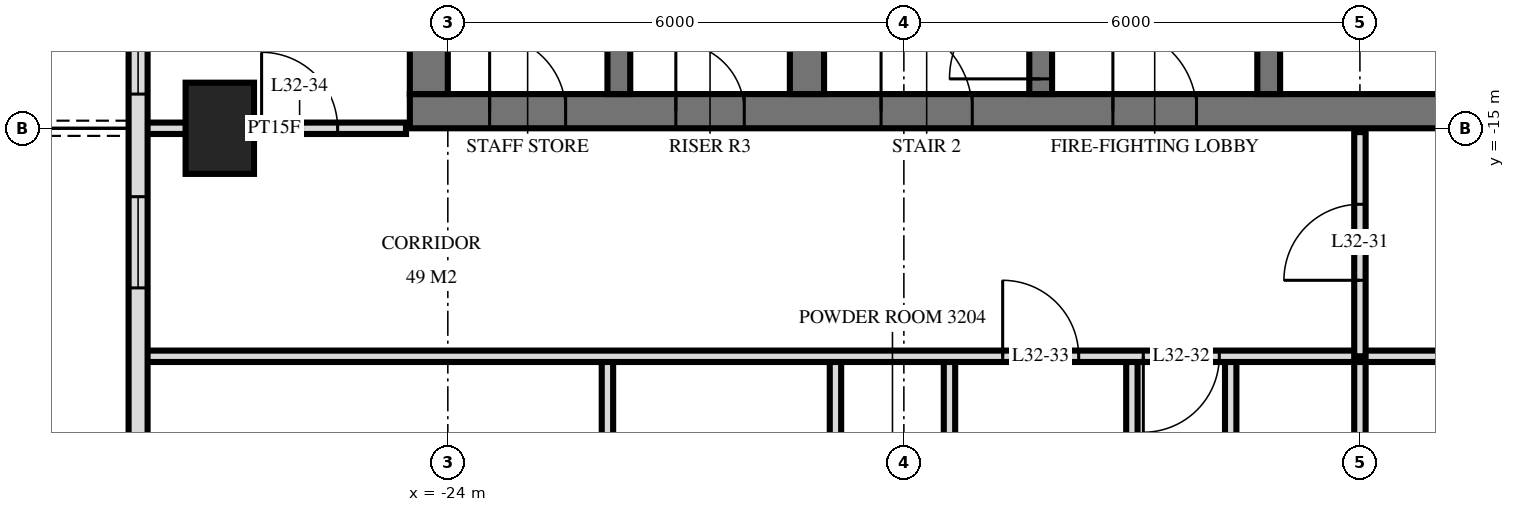
"""IFC4 building model, lengths in metres.
Left out: names, types, materials, properties, quantities, classifications, styles, units other than length and angle.
Written with IfcOpenShell. Run it as: python <this file> out.ifc"""

import sys

from ifc_helpers import new_model, si_unit, direction, frame, frame_2d, origin, origin_2d, place, context, subcontext, project, spatial, rectangle, extrude, element, fill, save


model = new_model("IFC4")
c1 = context("Model", 3, precision=1e-05, world=origin(), true_north=direction((0.0, 1.0)))
c2 = subcontext(c1, "Body", "Model", "MODEL_VIEW")
j1 = project(units=[si_unit("LENGTHUNIT", "METRE"), si_unit("PLANEANGLEUNIT", "RADIAN")], contexts=[c1])
p1 = place(None, origin())
s1 = spatial("IfcSite", under=j1, at=p1, CompositionType="ELEMENT")
p2 = place(p1, origin())
s2 = spatial("IfcBuilding", under=s1, at=p2, CompositionType="ELEMENT")
p3 = place(p2, frame((0.0, 0.0, 127.2)))
s3 = spatial("IfcBuildingStorey", under=s2, at=p3, CompositionType="ELEMENT", Elevation=127.2)
p4 = place(p3, frame((-27.0, -15.0, 0.0), z_axis=(0.0, 0.0, 1.0), x_axis=(0.0, 1.0, 0.0)))
e1 = element("IfcColumn", 1, at=p4, inside=s3, PredefinedType="COLUMN", context=c2, shape_type="SweptSolid", body=[
    extrude(rectangle(XDim=1.2, YDim=0.9, at=origin_2d()), origin(), (0.0, 0.0, 1.0), 3.6),
])
p5 = place(p3, frame((-24.5, -14.775, 0.0), z_axis=(0.0, 0.0, 1.0), x_axis=(1.0, 0.0, 0.0)))
e2 = element("IfcWall", 2, at=p5, inside=s3, PredefinedType="SHEAR", context=c2, shape_type="SweptSolid", body=[
    extrude(rectangle(XDim=14.5, YDim=0.45, at=frame_2d((7.25, 0.0))), origin(), (0.0, 0.0, 1.0), 3.6),
])
p6 = place(p5, frame((6.2, 0.0, 0.0)))
e3 = element("IfcOpeningElement", 3, at=p6, cuts=e2, PredefinedType="OPENING", context=c2, shape_type="SweptSolid", body=[
    extrude(rectangle(XDim=1.2, YDim=2.1, at=frame_2d((0.6, 1.05))), frame((0.0, 0.235, 0.0), z_axis=(0.0, -1.0, 0.0), x_axis=(1.0, 0.0, 0.0)), (0.0, 0.0, 1.0), 0.47),
])
p7 = place(p5, frame((9.25, 0.0, 0.0)))
e4 = element("IfcOpeningElement", 4, at=p7, cuts=e2, PredefinedType="OPENING", context=c2, shape_type="SweptSolid", body=[
    extrude(rectangle(XDim=1.1, YDim=2.1, at=frame_2d((0.55, 1.05))), frame((0.0, 0.235, 0.0), z_axis=(0.0, -1.0, 0.0), x_axis=(1.0, 0.0, 0.0)), (0.0, 0.0, 1.0), 0.47),
])
p8 = place(p5, frame((3.5, 0.0, 0.0)))
e5 = element("IfcOpeningElement", 5, at=p8, cuts=e2, PredefinedType="OPENING", context=c2, shape_type="SweptSolid", body=[
    extrude(rectangle(XDim=0.9, YDim=2.1, at=frame_2d((0.45, 1.05))), frame((0.0, 0.235, 0.0), z_axis=(0.0, -1.0, 0.0), x_axis=(1.0, 0.0, 0.0)), (0.0, 0.0, 1.0), 0.47),
])
p9 = place(p5, frame((1.05, 0.0, 0.0)))
e6 = element("IfcOpeningElement", 6, at=p9, cuts=e2, PredefinedType="OPENING", context=c2, shape_type="SweptSolid", body=[
    extrude(rectangle(XDim=1.0, YDim=2.1, at=frame_2d((0.5, 1.05))), frame((0.0, 0.235, 0.0), z_axis=(0.0, -1.0, 0.0), x_axis=(1.0, 0.0, 0.0)), (0.0, 0.0, 1.0), 0.47),
])
p10 = place(p3, frame((-24.25, -14.55, 0.0), z_axis=(0.0, 0.0, 1.0), x_axis=(0.0, 1.0, 0.0)))
e7 = element("IfcWall", 7, at=p10, inside=s3, PredefinedType="SHEAR", context=c2, shape_type="SweptSolid", body=[
    extrude(rectangle(XDim=14.1, YDim=0.5, at=frame_2d((7.05, 0.0))), origin(), (0.0, 0.0, 1.0), 3.6),
])
p11 = place(p3, frame((-13.2, -14.55, 0.0), z_axis=(0.0, 0.0, 1.0), x_axis=(0.0, 1.0, 0.0)))
e8 = element("IfcWall", 8, at=p11, inside=s3, PredefinedType="SHEAR", context=c2, shape_type="SweptSolid", body=[
    extrude(rectangle(XDim=5.4, YDim=0.3, at=frame_2d((2.7, 0.0))), origin(), (0.0, 0.0, 1.0), 3.6),
])
p12 = place(p11, frame((4.0, 0.0, 0.0)))
e9 = element("IfcOpeningElement", 9, at=p12, cuts=e8, PredefinedType="OPENING", context=c2, shape_type="SweptSolid", body=[
    extrude(rectangle(XDim=1.2, YDim=2.1, at=frame_2d((0.6, 1.05))), frame((0.0, 0.16, 0.0), z_axis=(0.0, -1.0, 0.0), x_axis=(1.0, 0.0, 0.0)), (0.0, 0.0, 1.0), 0.32),
])
p13 = place(p3, frame((-16.2, -14.55, 0.0), z_axis=(0.0, 0.0, 1.0), x_axis=(0.0, 1.0, 0.0)))
e10 = element("IfcWall", 10, at=p13, inside=s3, PredefinedType="SHEAR", context=c2, shape_type="SweptSolid", body=[
    extrude(rectangle(XDim=5.4, YDim=0.3, at=frame_2d((2.7, 0.0))), origin(), (0.0, 0.0, 1.0), 3.6),
])
p14 = place(p13, frame((0.2, 0.0, 0.0)))
e11 = element("IfcOpeningElement", 11, at=p14, cuts=e10, PredefinedType="OPENING", context=c2, shape_type="SweptSolid", body=[
    extrude(rectangle(XDim=1.2, YDim=2.1, at=frame_2d((0.6, 1.05))), frame((0.0, 0.16, 0.0), z_axis=(0.0, -1.0, 0.0), x_axis=(1.0, 0.0, 0.0)), (0.0, 0.0, 1.0), 0.32),
])
p15 = place(p3, frame((-19.275, -14.55, 0.0), z_axis=(0.0, 0.0, 1.0), x_axis=(0.0, 1.0, 0.0)))
e12 = element("IfcWall", 12, at=p15, inside=s3, PredefinedType="SHEAR", context=c2, shape_type="SweptSolid", body=[
    extrude(rectangle(XDim=5.4, YDim=0.45, at=frame_2d((2.7, 0.0))), origin(), (0.0, 0.0, 1.0), 3.6),
])
p16 = place(p3, frame((-21.75, -14.55, 0.0), z_axis=(0.0, 0.0, 1.0), x_axis=(0.0, 1.0, 0.0)))
e13 = element("IfcWall", 13, at=p16, inside=s3, PredefinedType="SHEAR", context=c2, shape_type="SweptSolid", body=[
    extrude(rectangle(XDim=5.4, YDim=0.3, at=frame_2d((2.7, 0.0))), origin(), (0.0, 0.0, 1.0), 3.6),
])
p17 = place(p3, frame((-28.075, -3.325, 0.0), z_axis=(0.0, 0.0, 1.0), x_axis=(0.0, -1.0, 0.0)))
e14 = element("IfcWall", 14, at=p17, inside=s3, PredefinedType="SOLIDWALL", context=c2, shape_type="SweptSolid", body=[
    extrude(rectangle(XDim=25.951, YDim=0.25, at=frame_2d((12.975, 0.0))), origin(), (0.0, 0.0, 1.0), 3.32),
])
p18 = place(p17, frame((6.575, 0.0, 0.0)))
e15 = element("IfcOpeningElement", 15, at=p18, cuts=e14, PredefinedType="OPENING", context=c2, shape_type="SweptSolid", body=[
    extrude(rectangle(XDim=1.8, YDim=2.4, at=frame_2d((0.9, 1.2))), frame((0.0, 0.135, 0.0), z_axis=(0.0, -1.0, 0.0), x_axis=(1.0, 0.0, 0.0)), (0.0, 0.0, 1.0), 0.27),
])
p19 = place(p17, frame((9.425, 0.0, 0.3)))
e16 = element("IfcOpeningElement", 16, at=p19, cuts=e14, PredefinedType="OPENING", context=c2, shape_type="SweptSolid", body=[
    extrude(rectangle(XDim=1.8, YDim=2.1, at=frame_2d((0.9, 1.05))), frame((0.0, 0.135, 0.0), z_axis=(0.0, -1.0, 0.0), x_axis=(1.0, 0.0, 0.0)), (0.0, 0.0, 1.0), 0.27),
])
p20 = place(p17, frame((12.575, 0.0, 0.3)))
e17 = element("IfcOpeningElement", 17, at=p20, cuts=e14, PredefinedType="OPENING", context=c2, shape_type="SweptSolid", body=[
    extrude(rectangle(XDim=1.2, YDim=2.1, at=frame_2d((0.6, 1.05))), frame((0.0, 0.135, 0.0), z_axis=(0.0, -1.0, 0.0), x_axis=(1.0, 0.0, 0.0)), (0.0, 0.0, 1.0), 0.27),
])
p21 = place(p17, frame((15.875, 0.0, 0.0)))
e18 = element("IfcOpeningElement", 18, at=p21, cuts=e14, PredefinedType="OPENING", context=c2, shape_type="SweptSolid", body=[
    extrude(rectangle(XDim=1.8, YDim=2.4, at=frame_2d((0.9, 1.2))), frame((0.0, 0.135, 0.0), z_axis=(0.0, -1.0, 0.0), x_axis=(1.0, 0.0, 0.0)), (0.0, 0.0, 1.0), 0.27),
])
p22 = place(p17, frame((21.075, 0.0, 0.0)))
e19 = element("IfcOpeningElement", 19, at=p22, cuts=e14, PredefinedType="OPENING", context=c2, shape_type="SweptSolid", body=[
    extrude(rectangle(XDim=1.8, YDim=2.4, at=frame_2d((0.9, 1.2))), frame((0.0, 0.135, 0.0), z_axis=(0.0, -1.0, 0.0), x_axis=(1.0, 0.0, 0.0)), (0.0, 0.0, 1.0), 0.27),
])
p23 = place(p17, frame((23.825, 0.0, 0.3)))
e20 = element("IfcOpeningElement", 20, at=p23, cuts=e14, PredefinedType="OPENING", context=c2, shape_type="SweptSolid", body=[
    extrude(rectangle(XDim=1.8, YDim=2.1, at=frame_2d((0.9, 1.05))), frame((0.0, 0.135, 0.0), z_axis=(0.0, -1.0, 0.0), x_axis=(1.0, 0.0, 0.0)), (0.0, 0.0, 1.0), 0.27),
])
p24 = place(p3, frame((-12.0, -18.0, 0.0), z_axis=(0.0, 0.0, 1.0), x_axis=(0.0, 1.0, 0.0)))
e21 = element("IfcWall", 21, at=p24, inside=s3, PredefinedType="PARTITIONING", context=c2, shape_type="SweptSolid", body=[
    extrude(rectangle(XDim=2.95, YDim=0.15, at=frame_2d((1.475, 0.0))), origin(), (0.0, 0.0, 1.0), 3.32),
])
p25 = place(p24, frame((1.0, 0.0, 0.0)))
e22 = element("IfcOpeningElement", 22, at=p25, cuts=e21, PredefinedType="OPENING", context=c2, shape_type="SweptSolid", body=[
    extrude(rectangle(XDim=1.0, YDim=2.1, at=frame_2d((0.5, 1.05))), frame((0.0, 0.085, 0.0), z_axis=(0.0, -1.0, 0.0), x_axis=(1.0, 0.0, 0.0)), (0.0, 0.0, 1.0), 0.17),
])
p26 = place(p3, frame((-12.0, -33.62, 0.0), z_axis=(0.0, 0.0, 1.0), x_axis=(0.0, 1.0, 0.0)))
e23 = element("IfcWall", 23, at=p26, inside=s3, PredefinedType="PARTITIONING", context=c2, shape_type="SweptSolid", body=[
    extrude(rectangle(XDim=15.62, YDim=0.15, at=frame_2d((7.81, 0.0))), origin(), (0.0, 0.0, 1.0), 3.32),
])
p27 = place(p3, frame((-13.7, -23.0, 0.0), z_axis=(0.0, 0.0, 1.0), x_axis=(0.0, 1.0, 0.0)))
e24 = element("IfcWall", 24, at=p27, inside=s3, PredefinedType="PARTITIONING", context=c2, shape_type="SweptSolid", body=[
    extrude(rectangle(XDim=5.0, YDim=0.15, at=frame_2d((2.5, 0.0))), origin(), (0.0, 0.0, 1.0), 3.32),
])
p28 = place(p27, frame((2.12, 0.0, 0.0)))
e25 = element("IfcOpeningElement", 25, at=p28, cuts=e24, PredefinedType="OPENING", context=c2, shape_type="SweptSolid", body=[
    extrude(rectangle(XDim=0.8, YDim=2.1, at=frame_2d((0.4, 1.05))), frame((0.0, 0.085, 0.0), z_axis=(0.0, -1.0, 0.0), x_axis=(1.0, 0.0, 0.0)), (0.0, 0.0, 1.0), 0.17),
])
p29 = place(p3, frame((-15.0, -22.2, 0.0), z_axis=(0.0, 0.0, 1.0), x_axis=(0.0, 1.0, 0.0)))
e26 = element("IfcWall", 26, at=p29, inside=s3, PredefinedType="PARTITIONING", context=c2, shape_type="SweptSolid", body=[
    extrude(rectangle(XDim=4.2, YDim=0.15, at=frame_2d((2.1, 0.0))), origin(), (0.0, 0.0, 1.0), 3.32),
])
p30 = place(p3, frame((-17.4, -22.2, 0.0), z_axis=(0.0, 0.0, 1.0), x_axis=(0.0, 1.0, 0.0)))
e27 = element("IfcWall", 27, at=p30, inside=s3, PredefinedType="PARTITIONING", context=c2, shape_type="SweptSolid", body=[
    extrude(rectangle(XDim=4.2, YDim=0.15, at=frame_2d((2.1, 0.0))), origin(), (0.0, 0.0, 1.0), 3.32),
])
p31 = place(p30, frame((1.58, 0.0, 0.0)))
e28 = element("IfcOpeningElement", 28, at=p31, cuts=e27, PredefinedType="OPENING", context=c2, shape_type="SweptSolid", body=[
    extrude(rectangle(XDim=1.0, YDim=2.1, at=frame_2d((0.5, 1.05))), frame((0.0, 0.085, 0.0), z_axis=(0.0, -1.0, 0.0), x_axis=(1.0, 0.0, 0.0)), (0.0, 0.0, 1.0), 0.17),
])
p32 = place(p3, frame((-18.9, -22.2, 0.0), z_axis=(0.0, 0.0, 1.0), x_axis=(0.0, 1.0, 0.0)))
e29 = element("IfcWall", 29, at=p32, inside=s3, PredefinedType="PLUMBINGWALL", context=c2, shape_type="SweptSolid", body=[
    extrude(rectangle(XDim=4.2, YDim=0.15, at=frame_2d((2.1, 0.0))), origin(), (0.0, 0.0, 1.0), 3.32),
])
p33 = place(p3, frame((-21.9, -22.2, 0.0), z_axis=(0.0, 0.0, 1.0), x_axis=(0.0, 1.0, 0.0)))
e30 = element("IfcWall", 30, at=p33, inside=s3, PredefinedType="PARTITIONING", context=c2, shape_type="SweptSolid", body=[
    extrude(rectangle(XDim=4.2, YDim=0.15, at=frame_2d((2.1, 0.0))), origin(), (0.0, 0.0, 1.0), 3.32),
])
p34 = place(p3, frame((-28.02, -18.0, 0.0), z_axis=(0.0, 0.0, 1.0), x_axis=(1.0, 0.0, 0.0)))
e31 = element("IfcWall", 31, at=p34, inside=s3, PredefinedType="PARTITIONING", context=c2, shape_type="SweptSolid", body=[
    extrude(rectangle(XDim=56.04, YDim=0.15, at=frame_2d((28.02, 0.0))), origin(), (0.0, 0.0, 1.0), 3.32),
])
p35 = place(p34, frame((13.17, 0.0, 0.0)))
e32 = element("IfcOpeningElement", 32, at=p35, cuts=e31, PredefinedType="OPENING", context=c2, shape_type="SweptSolid", body=[
    extrude(rectangle(XDim=1.0, YDim=2.1, at=frame_2d((0.5, 1.05))), frame((0.0, 0.085, 0.0), z_axis=(0.0, -1.0, 0.0), x_axis=(1.0, 0.0, 0.0)), (0.0, 0.0, 1.0), 0.17),
])
p36 = place(p34, frame((11.32, 0.0, 0.0)))
e33 = element("IfcOpeningElement", 33, at=p36, cuts=e31, PredefinedType="OPENING", context=c2, shape_type="SweptSolid", body=[
    extrude(rectangle(XDim=1.0, YDim=2.1, at=frame_2d((0.5, 1.05))), frame((0.0, 0.085, 0.0), z_axis=(0.0, -1.0, 0.0), x_axis=(1.0, 0.0, 0.0)), (0.0, 0.0, 1.0), 0.17),
])
p37 = place(p34, frame((41.87, 0.0, 0.0)))
e34 = element("IfcOpeningElement", 34, at=p37, cuts=e31, PredefinedType="OPENING", context=c2, shape_type="SweptSolid", body=[
    extrude(rectangle(XDim=1.0, YDim=2.1, at=frame_2d((0.5, 1.05))), frame((0.0, 0.085, 0.0), z_axis=(0.0, -1.0, 0.0), x_axis=(1.0, 0.0, 0.0)), (0.0, 0.0, 1.0), 0.17),
])
p38 = place(p34, frame((43.17, 0.0, 0.0)))
e35 = element("IfcOpeningElement", 35, at=p38, cuts=e31, PredefinedType="OPENING", context=c2, shape_type="SweptSolid", body=[
    extrude(rectangle(XDim=1.0, YDim=2.1, at=frame_2d((0.5, 1.05))), frame((0.0, 0.085, 0.0), z_axis=(0.0, -1.0, 0.0), x_axis=(1.0, 0.0, 0.0)), (0.0, 0.0, 1.0), 0.17),
])
p39 = place(p34, frame((46.72, 0.0, 0.0)))
e36 = element("IfcOpeningElement", 36, at=p39, cuts=e31, PredefinedType="OPENING", context=c2, shape_type="SweptSolid", body=[
    extrude(rectangle(XDim=1.0, YDim=2.1, at=frame_2d((0.5, 1.05))), frame((0.0, 0.085, 0.0), z_axis=(0.0, -1.0, 0.0), x_axis=(1.0, 0.0, 0.0)), (0.0, 0.0, 1.0), 0.17),
])
p40 = place(p34, frame((21.52, 0.0, 0.0)))
e37 = element("IfcOpeningElement", 37, at=p40, cuts=e31, PredefinedType="OPENING", context=c2, shape_type="SweptSolid", body=[
    extrude(rectangle(XDim=1.0, YDim=2.1, at=frame_2d((0.5, 1.05))), frame((0.0, 0.085, 0.0), z_axis=(0.0, -1.0, 0.0), x_axis=(1.0, 0.0, 0.0)), (0.0, 0.0, 1.0), 0.17),
])
p41 = place(p34, frame((33.52, 0.0, 0.0)))
e38 = element("IfcOpeningElement", 38, at=p41, cuts=e31, PredefinedType="OPENING", context=c2, shape_type="SweptSolid", body=[
    extrude(rectangle(XDim=1.0, YDim=2.1, at=frame_2d((0.5, 1.05))), frame((0.0, 0.085, 0.0), z_axis=(0.0, -1.0, 0.0), x_axis=(1.0, 0.0, 0.0)), (0.0, 0.0, 1.0), 0.17),
])
p42 = place(p3, frame((-28.02, -15.0, 0.0), z_axis=(0.0, 0.0, 1.0), x_axis=(1.0, 0.0, 0.0)))
e39 = element("IfcWall", 39, at=p42, inside=s3, PredefinedType="PARTITIONING", context=c2, shape_type="SweptSolid", body=[
    extrude(rectangle(XDim=3.47, YDim=0.15, at=frame_2d((1.735, 0.0))), origin(), (0.0, 0.0, 1.0), 3.32),
])
p43 = place(p42, frame((1.57, 0.0, 0.0)))
e40 = element("IfcOpeningElement", 40, at=p43, cuts=e39, PredefinedType="OPENING", context=c2, shape_type="SweptSolid", body=[
    extrude(rectangle(XDim=1.0, YDim=2.1, at=frame_2d((0.5, 1.05))), frame((0.0, 0.085, 0.0), z_axis=(0.0, -1.0, 0.0), x_axis=(1.0, 0.0, 0.0)), (0.0, 0.0, 1.0), 0.17),
])
p44 = place(p19, origin())
e41 = element("IfcWindow", 41, at=p44, inside=s3, PartitioningType="SINGLE_PANEL", PredefinedType="WINDOW", context=c2, shape_type="SweptSolid", body=[
    extrude(rectangle(XDim=1.8, YDim=2.1, at=frame_2d((0.9, 1.05))), frame((0.0, 0.03, 0.0), z_axis=(0.0, -1.0, 0.0), x_axis=(1.0, 0.0, 0.0)), (0.0, 0.0, 1.0), 0.06),
])
fill(e16, e41)
p45 = place(p20, origin())
e42 = element("IfcWindow", 42, at=p45, inside=s3, PartitioningType="SINGLE_PANEL", PredefinedType="WINDOW", context=c2, shape_type="SweptSolid", body=[
    extrude(rectangle(XDim=1.2, YDim=2.1, at=frame_2d((0.6, 1.05))), frame((0.0, 0.03, 0.0), z_axis=(0.0, -1.0, 0.0), x_axis=(1.0, 0.0, 0.0)), (0.0, 0.0, 1.0), 0.06),
])
fill(e17, e42)
p46 = place(p6, origin())
e43 = element("IfcDoor", 43, at=p46, inside=s3, OperationType="SINGLE_SWING_RIGHT", PredefinedType="DOOR", context=c2, shape_type="SweptSolid", body=[
    extrude(rectangle(XDim=1.2, YDim=2.1, at=frame_2d((0.6, 1.05))), frame((0.0, 0.025, 0.0), z_axis=(0.0, -1.0, 0.0), x_axis=(1.0, 0.0, 0.0)), (0.0, 0.0, 1.0), 0.05),
])
fill(e3, e43)
p47 = place(p7, origin())
e44 = element("IfcDoor", 44, at=p47, inside=s3, OperationType="SINGLE_SWING_RIGHT", PredefinedType="DOOR", context=c2, shape_type="SweptSolid", body=[
    extrude(rectangle(XDim=1.1, YDim=2.1, at=frame_2d((0.55, 1.05))), frame((0.0, 0.025, 0.0), z_axis=(0.0, -1.0, 0.0), x_axis=(1.0, 0.0, 0.0)), (0.0, 0.0, 1.0), 0.05),
])
fill(e4, e44)
p48 = place(p8, origin())
e45 = element("IfcDoor", 45, at=p48, inside=s3, OperationType="SINGLE_SWING_RIGHT", PredefinedType="DOOR", context=c2, shape_type="SweptSolid", body=[
    extrude(rectangle(XDim=0.9, YDim=2.1, at=frame_2d((0.45, 1.05))), frame((0.0, 0.025, 0.0), z_axis=(0.0, -1.0, 0.0), x_axis=(1.0, 0.0, 0.0)), (0.0, 0.0, 1.0), 0.05),
])
fill(e5, e45)
p49 = place(p9, origin())
e46 = element("IfcDoor", 46, at=p49, inside=s3, OperationType="SINGLE_SWING_RIGHT", PredefinedType="DOOR", context=c2, shape_type="SweptSolid", body=[
    extrude(rectangle(XDim=1.0, YDim=2.1, at=frame_2d((0.5, 1.05))), frame((0.0, 0.025, 0.0), z_axis=(0.0, -1.0, 0.0), x_axis=(1.0, 0.0, 0.0)), (0.0, 0.0, 1.0), 0.05),
])
fill(e6, e46)
p50 = place(p14, origin())
e47 = element("IfcDoor", 47, at=p50, inside=s3, OperationType="SINGLE_SWING_RIGHT", PredefinedType="DOOR", context=c2, shape_type="SweptSolid", body=[
    extrude(rectangle(XDim=1.2, YDim=2.1, at=frame_2d((0.6, 1.05))), frame((0.0, 0.025, 0.0), z_axis=(0.0, -1.0, 0.0), x_axis=(1.0, 0.0, 0.0)), (0.0, 0.0, 1.0), 0.05),
])
fill(e11, e47)
p51 = place(p25, origin())
e48 = element("IfcDoor", 48, at=p51, inside=s3, OperationType="SINGLE_SWING_RIGHT", PredefinedType="DOOR", context=c2, shape_type="SweptSolid", body=[
    extrude(rectangle(XDim=1.0, YDim=2.1, at=frame_2d((0.5, 1.05))), frame((0.0, 0.025, 0.0), z_axis=(0.0, -1.0, 0.0), x_axis=(1.0, 0.0, 0.0)), (0.0, 0.0, 1.0), 0.05),
])
fill(e22, e48)
p52 = place(p35, frame((0.5, 0.0, 0.0), z_axis=(0.0, 0.0, 1.0), x_axis=(-1.0, 0.0, 0.0)))
e49 = element("IfcDoor", 49, at=p52, inside=s3, OperationType="SINGLE_SWING_LEFT", PredefinedType="DOOR", context=c2, shape_type="SweptSolid", body=[
    extrude(rectangle(XDim=1.0, YDim=2.1, at=frame_2d((0.0, 1.05))), frame((0.0, -0.025, 0.0), z_axis=(0.0, 1.0, 0.0), x_axis=(-1.0, 0.0, 0.0)), (0.0, 0.0, 1.0), 0.05),
])
fill(e32, e49)
p53 = place(p36, origin())
e50 = element("IfcDoor", 50, at=p53, inside=s3, OperationType="SINGLE_SWING_RIGHT", PredefinedType="DOOR", context=c2, shape_type="SweptSolid", body=[
    extrude(rectangle(XDim=1.0, YDim=2.1, at=frame_2d((0.5, 1.05))), frame((0.0, 0.025, 0.0), z_axis=(0.0, -1.0, 0.0), x_axis=(1.0, 0.0, 0.0)), (0.0, 0.0, 1.0), 0.05),
])
fill(e33, e50)
p54 = place(p43, origin())
e51 = element("IfcDoor", 51, at=p54, inside=s3, OperationType="SINGLE_SWING_RIGHT", PredefinedType="DOOR", context=c2, shape_type="SweptSolid", body=[
    extrude(rectangle(XDim=1.0, YDim=2.1, at=frame_2d((0.5, 1.05))), frame((0.0, 0.025, 0.0), z_axis=(0.0, -1.0, 0.0), x_axis=(1.0, 0.0, 0.0)), (0.0, 0.0, 1.0), 0.05),
])
fill(e40, e51)
save(model, sys.argv[1])
